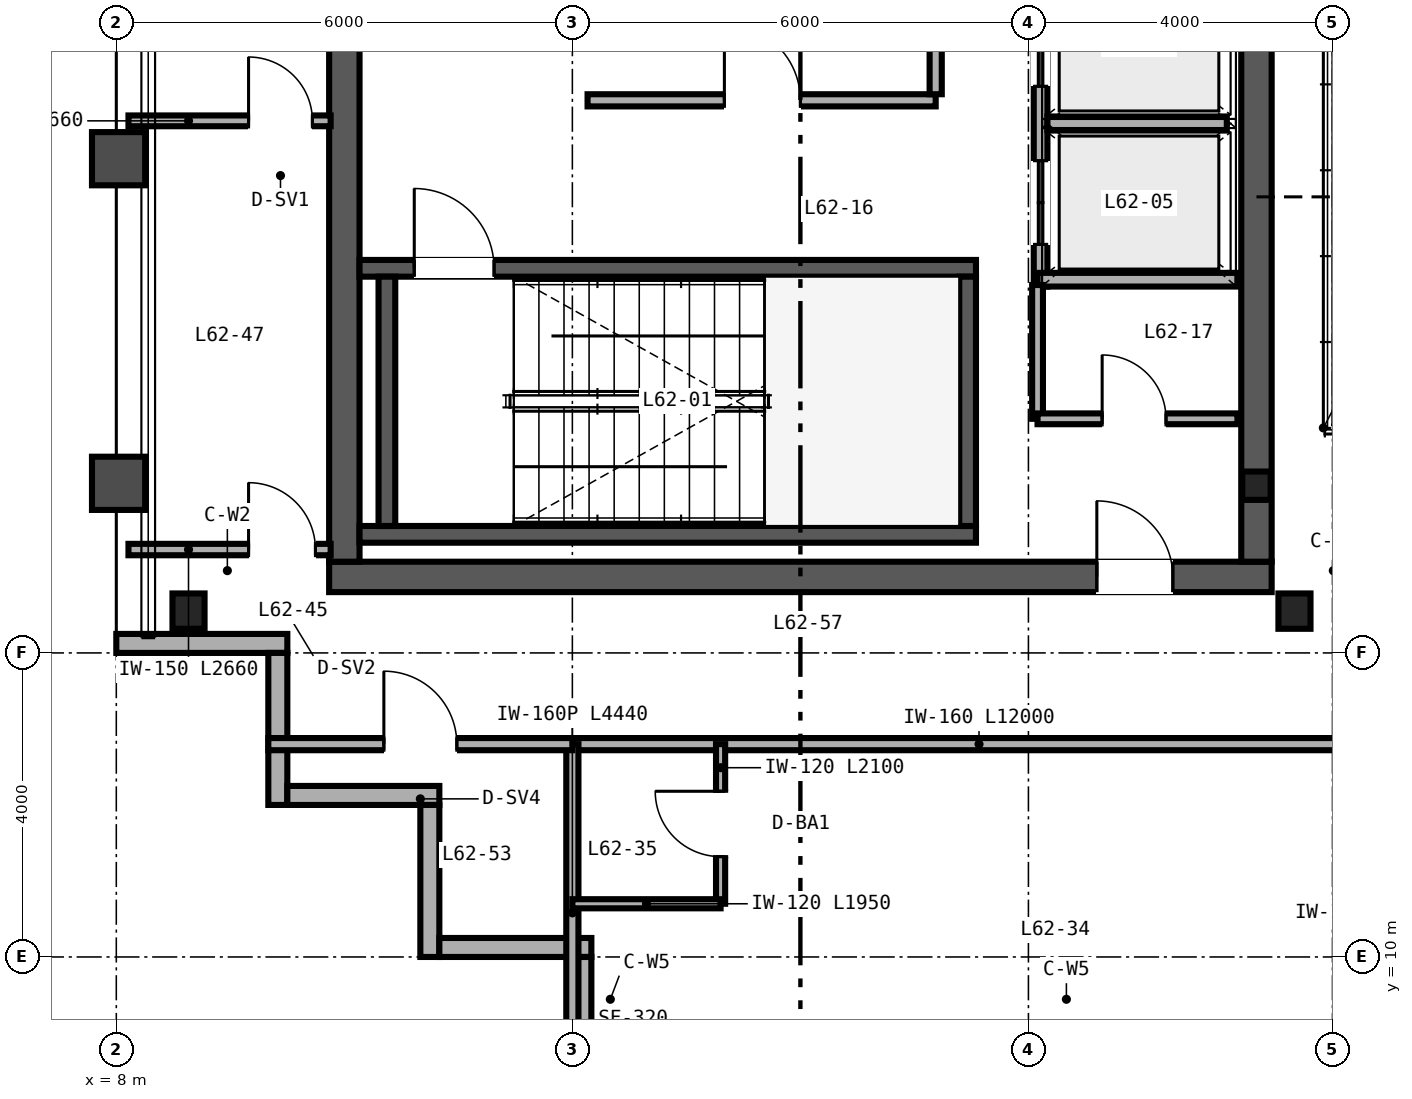
"""IFC4 building model, lengths in metres.
Left out: names, types, materials, properties, quantities, classifications, styles, units other than length and angle.
Written with IfcOpenShell. Run it as: python <this file> out.ifc"""

import sys

from ifc_helpers import new_model, si_unit, direction, frame, frame_2d, origin, origin_2d, place, context, subcontext, project, spatial, rectangle, i_section, extrude, source, transform, mapped, element, fill, save


model = new_model("IFC4")
c1 = context("Model", 3, precision=1e-05, world=origin(), true_north=direction((0.0, 1.0)))
c2 = subcontext(c1, "Body", "Model", "MODEL_VIEW")
j1 = project(units=[si_unit("LENGTHUNIT", "METRE"), si_unit("PLANEANGLEUNIT", "RADIAN")], contexts=[c1])
p1 = place(None, origin())
s1 = spatial("IfcSite", under=j1, at=p1, CompositionType="ELEMENT")
p2 = place(p1, origin())
s2 = spatial("IfcBuilding", under=s1, at=p2, CompositionType="ELEMENT")
p3 = place(p2, frame((0.0, 0.0, 247.2)))
s3 = spatial("IfcBuildingStorey", under=s2, at=p3, CompositionType="ELEMENT", Elevation=247.2)
m1 = source(origin(), c2, "Body", "SweptSolid", [
    extrude(i_section(OverallWidth=0.374, OverallDepth=0.373, WebThickness=0.016, FlangeThickness=0.026, FilletRadius=0.025, at=origin_2d()), origin(), (0.0, 0.0, 1.0), 3.6),
])
p4 = place(p3, frame((23.0, 16.2, 0.0), z_axis=(0.0, 0.0, 1.0), x_axis=(1.0, 0.0, 0.0)))
e1 = element("IfcColumn", 1, at=p4, inside=s3, PredefinedType="COLUMN", context=c2, shape_type="MappedRepresentation", body=[
    mapped(m1, transform((0.0, 0.0, 0.0), scale=1.0)),
])
p5 = place(p3, frame((10.8, 15.0, 0.0), z_axis=(0.0, 0.0, 1.0), x_axis=(1.0, 0.0, 0.0)))
e2 = element("IfcWall", 2, at=p5, inside=s3, PredefinedType="SHEAR", context=c2, shape_type="SweptSolid", body=[
    extrude(rectangle(XDim=12.4, YDim=0.4, at=frame_2d((6.2, 0.0))), origin(), (0.0, 0.0, 1.0), 3.38),
])
p6 = place(p5, frame((10.1, 0.0, 0.0)))
e3 = element("IfcOpeningElement", 3, at=p6, cuts=e2, PredefinedType="OPENING", context=c2, shape_type="SweptSolid", body=[
    extrude(rectangle(XDim=1.0, YDim=2.15, at=frame_2d((0.5, 1.075))), frame((0.0, 0.21, 0.0), z_axis=(0.0, -1.0, 0.0), x_axis=(1.0, 0.0, 0.0)), (0.0, 0.0, 1.0), 0.42),
])
for number, where, z_axis, x_axis in (
    (4, (11.0, 15.2, 0.0), (0.0, 0.0, 1.0), (0.0, 1.0, 0.0)),
    (5, (23.0, 15.2, 0.0), (0.0, 0.0, 1.0), (0.0, 1.0, 0.0)),
):
    element("IfcWall", number, at=place(p3, frame(where, z_axis=z_axis, x_axis=x_axis)), inside=s3, PredefinedType="SHEAR", context=c2, shape_type="SweptSolid", body=[
        extrude(rectangle(XDim=21.6, YDim=0.4, at=frame_2d((10.8, 0.0))), origin(), (0.0, 0.0, 1.0), 3.38),
    ])
p7 = place(p3, frame((11.2, 15.56, 0.0), z_axis=(0.0, 0.0, 1.0), x_axis=(1.0, 0.0, 0.0)))
e6 = element("IfcWall", 6, at=p7, inside=s3, PredefinedType="SHEAR", context=c2, shape_type="SweptSolid", body=[
    extrude(rectangle(XDim=8.11, YDim=0.22, at=frame_2d((4.055, 0.0))), origin(), (0.0, 0.0, 1.0), 3.4),
])
p8 = place(p3, frame((11.2, 19.06, 0.0), z_axis=(0.0, 0.0, 1.0), x_axis=(1.0, 0.0, 0.0)))
e7 = element("IfcWall", 7, at=p8, inside=s3, PredefinedType="SHEAR", context=c2, shape_type="SweptSolid", body=[
    extrude(rectangle(XDim=8.11, YDim=0.22, at=frame_2d((4.055, 0.0))), origin(), (0.0, 0.0, 1.0), 3.4),
])
p9 = place(p8, frame((0.72, 0.0, 0.0)))
e8 = element("IfcOpeningElement", 8, at=p9, cuts=e7, PredefinedType="OPENING", context=c2, shape_type="SweptSolid", body=[
    extrude(rectangle(XDim=1.05, YDim=2.15, at=frame_2d((0.525, 1.075))), frame((0.0, 0.12, 0.0), z_axis=(0.0, -1.0, 0.0), x_axis=(1.0, 0.0, 0.0)), (0.0, 0.0, 1.0), 0.24),
])
for number, where, z_axis, x_axis in (
    (9, (11.56, 15.67, 0.0), (0.0, 0.0, 1.0), (0.0, 1.0, 0.0)),
    (10, (19.2, 15.67, 0.0), (0.0, 0.0, 1.0), (0.0, 1.0, 0.0)),
):
    element("IfcWall", number, at=place(p3, frame(where, z_axis=z_axis, x_axis=x_axis)), inside=s3, PredefinedType="SHEAR", context=c2, shape_type="SweptSolid", body=[
        extrude(rectangle(XDim=3.28, YDim=0.22, at=frame_2d((1.64, 0.0))), origin(), (0.0, 0.0, 1.0), 3.4),
    ])
m2 = source(origin(), c2, "Body", "SweptSolid", [
    extrude(i_section(OverallWidth=0.422, OverallDepth=0.465, WebThickness=0.045, FlangeThickness=0.073, FilletRadius=0.025, at=origin_2d()), origin(), (0.0, 0.0, 1.0), 3.38),
])
for number, where, z_axis, x_axis in (
    (11, (8.95, 14.55, 0.0), (0.0, 0.0, 1.0), (1.0, 0.0, 0.0)),
    (12, (23.5, 14.55, 0.0), (0.0, 0.0, 1.0), (1.0, 0.0, 0.0)),
):
    element("IfcColumn", number, at=place(p3, frame(where, z_axis=z_axis, x_axis=x_axis)), inside=s3, PredefinedType="COLUMN", context=c2, shape_type="MappedRepresentation", body=[
        mapped(m2, transform((0.0, 0.0, 0.0), scale=1.0)),
    ])
p10 = place(p3, frame((8.0, 14.125, 0.0), z_axis=(0.0, 0.0, 1.0), x_axis=(1.0, 0.0, 0.0)))
e13 = element("IfcWall", 13, at=p10, inside=s3, PredefinedType="SOLIDWALL", context=c2, shape_type="SweptSolid", body=[
    extrude(rectangle(XDim=2.25, YDim=0.25, at=frame_2d((1.125, 0.0))), origin(), (0.0, 0.0, 1.0), 3.38),
])
for number, where, z_axis, x_axis in (
    (14, (10.125, 14.0, 0.0), (0.0, 0.0, 1.0), (0.0, -1.0, 0.0)),
    (15, (10.25, 12.125, 0.0), (0.0, 0.0, 1.0), (1.0, 0.0, 0.0)),
    (16, (12.125, 12.0, 0.0), (0.0, 0.0, 1.0), (0.0, -1.0, 0.0)),
    (17, (12.25, 10.125, 0.0), (0.0, 0.0, 1.0), (1.0, 0.0, 0.0)),
):
    element("IfcWall", number, at=place(p3, frame(where, z_axis=z_axis, x_axis=x_axis)), inside=s3, PredefinedType="SOLIDWALL", context=c2, shape_type="SweptSolid", body=[
        extrude(rectangle(XDim=2.0, YDim=0.25, at=frame_2d((1.0, 0.0))), origin(), (0.0, 0.0, 1.0), 3.38),
    ])
p11 = place(p3, frame((14.125, 10.0, 0.0), z_axis=(0.0, 0.0, 1.0), x_axis=(0.0, -1.0, 0.0)))
e18 = element("IfcWall", 18, at=p11, inside=s3, PredefinedType="SOLIDWALL", context=c2, shape_type="SweptSolid", body=[
    extrude(rectangle(XDim=2.0, YDim=0.25, at=frame_2d((1.0, 0.0))), origin(), (0.0, 0.0, 1.0), 2.687),
])
p12 = place(p3, frame((20.16, 18.82, 0.0), z_axis=(0.0, 0.0, 1.0), x_axis=(0.0, 1.0, 0.0)))
e19 = element("IfcWall", 19, at=p12, inside=s3, PredefinedType="SOLIDWALL", context=c2, shape_type="SweptSolid", body=[
    extrude(rectangle(XDim=6.32, YDim=0.18, at=frame_2d((3.16, 0.0))), origin(), (0.0, 0.0, 1.0), 2.48),
])
p13 = place(p12, frame((0.555, 0.0, 0.0)))
e20 = element("IfcOpeningElement", 20, at=p13, cuts=e19, PredefinedType="OPENING", context=c2, shape_type="SweptSolid", body=[
    extrude(rectangle(XDim=1.1, YDim=2.2, at=frame_2d((0.55, 1.1))), frame((0.0, 0.1, 0.0), z_axis=(0.0, -1.0, 0.0), x_axis=(1.0, 0.0, 0.0)), (0.0, 0.0, 1.0), 0.2),
])
p14 = place(p12, frame((2.635, 0.0, 0.0)))
e21 = element("IfcOpeningElement", 21, at=p14, cuts=e19, PredefinedType="OPENING", context=c2, shape_type="SweptSolid", body=[
    extrude(rectangle(XDim=1.1, YDim=2.2, at=frame_2d((0.55, 1.1))), frame((0.0, 0.1, 0.0), z_axis=(0.0, -1.0, 0.0), x_axis=(1.0, 0.0, 0.0)), (0.0, 0.0, 1.0), 0.2),
])
p15 = place(p12, frame((4.69, 0.0, 0.0)))
e22 = element("IfcOpeningElement", 22, at=p15, cuts=e19, PredefinedType="OPENING", context=c2, shape_type="SweptSolid", body=[
    extrude(rectangle(XDim=1.1, YDim=2.2, at=frame_2d((0.55, 1.1))), frame((0.0, 0.1, 0.0), z_axis=(0.0, -1.0, 0.0), x_axis=(1.0, 0.0, 0.0)), (0.0, 0.0, 1.0), 0.2),
])
p16 = place(p3, frame((20.12, 18.91, 0.0), z_axis=(0.0, 0.0, 1.0), x_axis=(1.0, 0.0, 0.0)))
e23 = element("IfcWall", 23, at=p16, inside=s3, PredefinedType="SOLIDWALL", context=c2, shape_type="SweptSolid", body=[
    extrude(rectangle(XDim=2.63, YDim=0.18, at=frame_2d((1.315, 0.0))), origin(), (0.0, 0.0, 1.0), 3.38),
])
p17 = place(p3, frame((20.25, 20.965, 0.0), z_axis=(0.0, 0.0, 1.0), x_axis=(1.0, 0.0, 0.0)))
e24 = element("IfcWall", 24, at=p17, inside=s3, PredefinedType="SOLIDWALL", context=c2, shape_type="SweptSolid", body=[
    extrude(rectangle(XDim=2.36, YDim=0.18, at=frame_2d((1.18, 0.0))), origin(), (0.0, 0.0, 1.0), 2.48),
])
p18 = place(p3, frame((14.2, 21.27, 0.0), z_axis=(0.0, 0.0, 1.0), x_axis=(1.0, 0.0, 0.0)))
e25 = element("IfcWall", 25, at=p18, inside=s3, PredefinedType="PARTITIONING", context=c2, shape_type="SweptSolid", body=[
    extrude(rectangle(XDim=4.58, YDim=0.16, at=frame_2d((2.29, 0.0))), origin(), (0.0, 0.0, 1.0), 3.38),
])
p19 = place(p18, frame((1.8, 0.0, 0.0)))
e26 = element("IfcOpeningElement", 26, at=p19, cuts=e25, PredefinedType="OPENING", context=c2, shape_type="SweptSolid", body=[
    extrude(rectangle(XDim=1.0, YDim=2.15, at=frame_2d((0.5, 1.075))), frame((0.0, 0.09, 0.0), z_axis=(0.0, -1.0, 0.0), x_axis=(1.0, 0.0, 0.0)), (0.0, 0.0, 1.0), 0.18),
])
p20 = place(p3, frame((18.78, 21.35, 0.0), z_axis=(0.0, 0.0, 1.0), x_axis=(0.0, 1.0, 0.0)))
e27 = element("IfcWall", 27, at=p20, inside=s3, PredefinedType="PARTITIONING", context=c2, shape_type="SweptSolid", body=[
    extrude(rectangle(XDim=3.81, YDim=0.16, at=frame_2d((1.905, 0.0))), origin(), (0.0, 0.0, 1.0), 3.38),
])
p21 = place(p3, frame((20.12, 17.08, 0.0), z_axis=(0.0, 0.0, 1.0), x_axis=(0.0, 1.0, 0.0)))
e28 = element("IfcWall", 28, at=p21, inside=s3, PredefinedType="PARTITIONING", context=c2, shape_type="SweptSolid", body=[
    extrude(rectangle(XDim=1.76, YDim=0.142, at=frame_2d((0.88, 0.0))), origin(), (0.0, 0.0, 1.0), 3.38),
])
p22 = place(p3, frame((20.12, 17.08, 0.0), z_axis=(0.0, 0.0, 1.0), x_axis=(1.0, 0.0, 0.0)))
e29 = element("IfcWall", 29, at=p22, inside=s3, PredefinedType="PARTITIONING", context=c2, shape_type="SweptSolid", body=[
    extrude(rectangle(XDim=2.63, YDim=0.142, at=frame_2d((1.315, 0.0))), origin(), (0.0, 0.0, 1.0), 3.38),
])
p23 = place(p22, frame((0.85, 0.0, 0.0)))
e30 = element("IfcOpeningElement", 30, at=p23, cuts=e29, PredefinedType="OPENING", context=c2, shape_type="SweptSolid", body=[
    extrude(rectangle(XDim=0.84, YDim=2.1, at=frame_2d((0.42, 1.05))), frame((0.0, 0.081, 0.0), z_axis=(0.0, -1.0, 0.0), x_axis=(1.0, 0.0, 0.0)), (0.0, 0.0, 1.0), 0.162),
])
p24 = place(p3, frame((14.0, 12.8, 0.0), z_axis=(0.0, 0.0, 1.0), x_axis=(1.0, 0.0, 0.0)))
e31 = element("IfcWall", 31, at=p24, inside=s3, PredefinedType="PARTITIONING", context=c2, shape_type="SweptSolid", body=[
    extrude(rectangle(XDim=12.0, YDim=0.16, at=frame_2d((6.0, 0.0))), origin(), (0.0, 0.0, 1.0), 2.923),
])
p25 = place(p24, frame((10.7, 0.0, 0.0)))
e32 = element("IfcOpeningElement", 32, at=p25, cuts=e31, PredefinedType="OPENING", context=c2, shape_type="SweptSolid", body=[
    extrude(rectangle(XDim=0.98, YDim=2.2, at=frame_2d((0.49, 1.1))), frame((0.0, 0.09, 0.0), z_axis=(0.0, -1.0, 0.0), x_axis=(1.0, 0.0, 0.0)), (0.0, 0.0, 1.0), 0.18),
])
p26 = place(p3, frame((14.0, 8.36, 0.0), z_axis=(0.0, 0.0, 1.0), x_axis=(0.0, 1.0, 0.0)))
e33 = element("IfcWall", 33, at=p26, inside=s3, PredefinedType="PARTITIONING", context=c2, shape_type="SweptSolid", body=[
    extrude(rectangle(XDim=4.44, YDim=0.16, at=frame_2d((2.22, 0.0))), origin(), (0.0, 0.0, 1.0), 2.687),
])
p27 = place(p3, frame((15.95, 10.7, 0.0), z_axis=(0.0, 0.0, 1.0), x_axis=(0.0, 1.0, 0.0)))
e34 = element("IfcWall", 34, at=p27, inside=s3, PredefinedType="PARTITIONING", context=c2, shape_type="SweptSolid", body=[
    extrude(rectangle(XDim=2.1, YDim=0.12, at=frame_2d((1.05, 0.0))), origin(), (0.0, 0.0, 1.0), 3.38),
])
p28 = place(p27, frame((0.62, 0.0, 0.0)))
e35 = element("IfcOpeningElement", 35, at=p28, cuts=e34, PredefinedType="OPENING", context=c2, shape_type="SweptSolid", body=[
    extrude(rectangle(XDim=0.86, YDim=2.1, at=frame_2d((0.43, 1.05))), frame((0.0, 0.07, 0.0), z_axis=(0.0, -1.0, 0.0), x_axis=(1.0, 0.0, 0.0)), (0.0, 0.0, 1.0), 0.14),
])
p29 = place(p3, frame((14.0, 10.7, 0.0), z_axis=(0.0, 0.0, 1.0), x_axis=(1.0, 0.0, 0.0)))
e36 = element("IfcWall", 36, at=p29, inside=s3, PredefinedType="PARTITIONING", context=c2, shape_type="SweptSolid", body=[
    extrude(rectangle(XDim=1.95, YDim=0.12, at=frame_2d((0.975, 0.0))), origin(), (0.0, 0.0, 1.0), 3.38),
])
p30 = place(p3, frame((8.16, 15.36, 0.0), z_axis=(0.0, 0.0, 1.0), x_axis=(1.0, 0.0, 0.0)))
e37 = element("IfcWall", 37, at=p30, inside=s3, PredefinedType="PARTITIONING", context=c2, shape_type="SweptSolid", body=[
    extrude(rectangle(XDim=2.66, YDim=0.15, at=frame_2d((1.33, 0.0))), origin(), (0.0, 0.0, 1.0), 2.601),
])
p31 = place(p30, frame((1.58, 0.0, 0.0)))
e38 = element("IfcOpeningElement", 38, at=p31, cuts=e37, PredefinedType="OPENING", context=c2, shape_type="SweptSolid", body=[
    extrude(rectangle(XDim=0.88, YDim=2.15, at=frame_2d((0.44, 1.075))), frame((0.0, 0.085, 0.0), z_axis=(0.0, -1.0, 0.0), x_axis=(1.0, 0.0, 0.0)), (0.0, 0.0, 1.0), 0.17),
])
p32 = place(p3, frame((8.16, 21.0, 0.0), z_axis=(0.0, 0.0, 1.0), x_axis=(1.0, 0.0, 0.0)))
e39 = element("IfcWall", 39, at=p32, inside=s3, PredefinedType="PARTITIONING", context=c2, shape_type="SweptSolid", body=[
    extrude(rectangle(XDim=2.66, YDim=0.142, at=frame_2d((1.33, 0.0))), origin(), (0.0, 0.0, 1.0), 2.48),
])
p33 = place(p32, frame((1.58, 0.0, 0.0)))
e40 = element("IfcOpeningElement", 40, at=p33, cuts=e39, PredefinedType="OPENING", context=c2, shape_type="SweptSolid", body=[
    extrude(rectangle(XDim=0.84, YDim=2.1, at=frame_2d((0.42, 1.05))), frame((0.0, 0.081, 0.0), z_axis=(0.0, -1.0, 0.0), x_axis=(1.0, 0.0, 0.0)), (0.0, 0.0, 1.0), 0.162),
])
p34 = place(p3, frame((10.0, 12.8, 0.0), z_axis=(0.0, 0.0, 1.0), x_axis=(1.0, 0.0, 0.0)))
e41 = element("IfcWall", 41, at=p34, inside=s3, PredefinedType="PARTITIONING", context=c2, shape_type="SweptSolid", body=[
    extrude(rectangle(XDim=4.0, YDim=0.16, at=frame_2d((2.0, 0.0))), origin(), (0.0, 0.0, 1.0), 3.38),
])
p35 = place(p34, frame((1.52, 0.0, 0.0)))
e42 = element("IfcOpeningElement", 42, at=p35, cuts=e41, PredefinedType="OPENING", context=c2, shape_type="SweptSolid", body=[
    extrude(rectangle(XDim=0.96, YDim=2.15, at=frame_2d((0.48, 1.075))), frame((0.0, 0.09, 0.0), z_axis=(0.0, -1.0, 0.0), x_axis=(1.0, 0.0, 0.0)), (0.0, 0.0, 1.0), 0.18),
])
m3 = source(origin(), c2, "Body", "SweptSolid", [
    extrude(rectangle(XDim=1.05, YDim=2.15, at=frame_2d((0.525, 1.075))), frame((0.0, 0.025, 0.0), z_axis=(0.0, -1.0, 0.0), x_axis=(1.0, 0.0, 0.0)), (0.0, 0.0, 1.0), 0.05),
])
p36 = place(p9, origin())
e43 = element("IfcDoor", 43, at=p36, inside=s3, OperationType="SINGLE_SWING_LEFT", PredefinedType="DOOR", context=c2, shape_type="MappedRepresentation", body=[
    mapped(m3, transform((0.0, 0.0, 0.0), scale=1.0)),
])
fill(e8, e43)
m4 = source(origin(), c2, "Body", "SweptSolid", [
    extrude(rectangle(XDim=1.1, YDim=2.2, at=frame_2d((0.55, 1.1))), frame((0.0, 0.025, 0.0), z_axis=(0.0, -1.0, 0.0), x_axis=(1.0, 0.0, 0.0)), (0.0, 0.0, 1.0), 0.05),
])
p37 = place(p13, origin())
e44 = element("IfcDoor", 44, at=p37, inside=s3, OperationType="DOUBLE_DOOR_SLIDING", PredefinedType="DOOR", context=c2, shape_type="MappedRepresentation", body=[
    mapped(m4, transform((0.0, 0.0, 0.0), scale=1.0)),
])
fill(e20, e44)
p38 = place(p14, origin())
e45 = element("IfcDoor", 45, at=p38, inside=s3, OperationType="DOUBLE_DOOR_SLIDING", PredefinedType="DOOR", context=c2, shape_type="MappedRepresentation", body=[
    mapped(m4, transform((0.0, 0.0, 0.0), scale=1.0)),
])
fill(e21, e45)
m5 = source(origin(), c2, "Body", "SweptSolid", [
    extrude(rectangle(XDim=1.0, YDim=2.15, at=frame_2d((0.5, 1.075))), frame((0.0, 0.025, 0.0), z_axis=(0.0, -1.0, 0.0), x_axis=(1.0, 0.0, 0.0)), (0.0, 0.0, 1.0), 0.05),
])
p39 = place(p19, origin())
e46 = element("IfcDoor", 46, at=p39, inside=s3, OperationType="SINGLE_SWING_LEFT", PredefinedType="DOOR", context=c2, shape_type="MappedRepresentation", body=[
    mapped(m5, transform((0.0, 0.0, 0.0), scale=1.0)),
])
fill(e26, e46)
m6 = source(origin(), c2, "Body", "SweptSolid", [
    extrude(rectangle(XDim=0.84, YDim=2.1, at=frame_2d((0.42, 1.05))), frame((0.0, 0.025, 0.0), z_axis=(0.0, -1.0, 0.0), x_axis=(1.0, 0.0, 0.0)), (0.0, 0.0, 1.0), 0.05),
])
p40 = place(p23, origin())
e47 = element("IfcDoor", 47, at=p40, inside=s3, OperationType="SINGLE_SWING_LEFT", PredefinedType="DOOR", context=c2, shape_type="MappedRepresentation", body=[
    mapped(m6, transform((0.0, 0.0, 0.0), scale=1.0)),
])
fill(e30, e47)
p41 = place(p6, origin())
e48 = element("IfcDoor", 48, at=p41, inside=s3, OperationType="SINGLE_SWING_LEFT", PredefinedType="DOOR", context=c2, shape_type="MappedRepresentation", body=[
    mapped(m5, transform((0.0, 0.0, 0.0), scale=1.0)),
])
fill(e3, e48)
m7 = source(origin(), c2, "Body", "SweptSolid", [
    extrude(rectangle(XDim=0.86, YDim=2.1, at=frame_2d((0.43, 1.05))), frame((0.0, 0.025, 0.0), z_axis=(0.0, -1.0, 0.0), x_axis=(1.0, 0.0, 0.0)), (0.0, 0.0, 1.0), 0.05),
])
p42 = place(p28, origin())
e49 = element("IfcDoor", 49, at=p42, inside=s3, OperationType="SINGLE_SWING_RIGHT", PredefinedType="DOOR", context=c2, shape_type="MappedRepresentation", body=[
    mapped(m7, transform((0.0, 0.0, 0.0), scale=1.0)),
])
fill(e35, e49)
m8 = source(origin(), c2, "Body", "SweptSolid", [
    extrude(rectangle(XDim=0.88, YDim=2.15, at=frame_2d((0.44, 1.075))), frame((0.0, 0.025, 0.0), z_axis=(0.0, -1.0, 0.0), x_axis=(1.0, 0.0, 0.0)), (0.0, 0.0, 1.0), 0.05),
])
p43 = place(p31, origin())
e50 = element("IfcDoor", 50, at=p43, inside=s3, OperationType="SINGLE_SWING_LEFT", PredefinedType="DOOR", context=c2, shape_type="MappedRepresentation", body=[
    mapped(m8, transform((0.0, 0.0, 0.0), scale=1.0)),
])
fill(e38, e50)
p44 = place(p33, origin())
e51 = element("IfcDoor", 51, at=p44, inside=s3, OperationType="SINGLE_SWING_LEFT", PredefinedType="DOOR", context=c2, shape_type="MappedRepresentation", body=[
    mapped(m6, transform((0.0, 0.0, 0.0), scale=1.0)),
])
fill(e40, e51)
m9 = source(origin(), c2, "Body", "SweptSolid", [
    extrude(rectangle(XDim=0.96, YDim=2.15, at=frame_2d((0.48, 1.075))), frame((0.0, 0.025, 0.0), z_axis=(0.0, -1.0, 0.0), x_axis=(1.0, 0.0, 0.0)), (0.0, 0.0, 1.0), 0.05),
])
p45 = place(p35, origin())
e52 = element("IfcDoor", 52, at=p45, inside=s3, OperationType="SINGLE_SWING_LEFT", PredefinedType="DOOR", context=c2, shape_type="MappedRepresentation", body=[
    mapped(m9, transform((0.0, 0.0, 0.0), scale=1.0)),
])
fill(e42, e52)
save(model, sys.argv[1])
